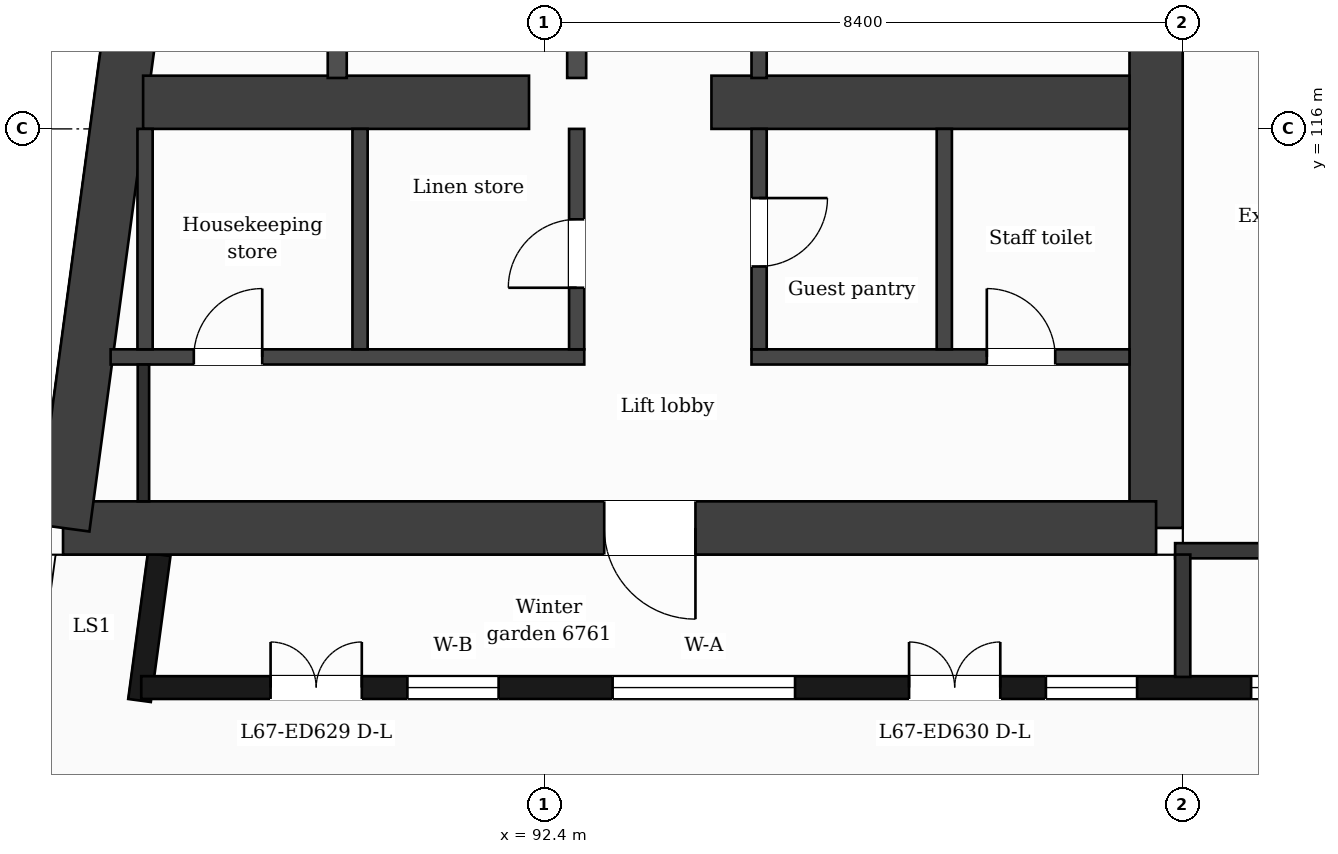
"""IFC4 building model, lengths in metres.
Left out: names, types, materials, properties, quantities, classifications, styles, units other than length and angle.
Written with IfcOpenShell. Run it as: python <this file> out.ifc"""

import sys

from ifc_helpers import new_model, si_unit, direction, frame, frame_2d, origin, place, context, subcontext, project, spatial, rectangle, extrude, element, fill, save


model = new_model("IFC4")
c1 = context("Model", 3, precision=1e-05, world=origin(), true_north=direction((0.0, 1.0)))
c2 = subcontext(c1, "Body", "Model", "MODEL_VIEW")
j1 = project(units=[si_unit("LENGTHUNIT", "METRE"), si_unit("PLANEANGLEUNIT", "RADIAN")], contexts=[c1])
p1 = place(None, origin())
s1 = spatial("IfcSite", under=j1, at=p1, CompositionType="ELEMENT")
p2 = place(p1, origin())
s2 = spatial("IfcBuilding", under=s1, at=p2, CompositionType="ELEMENT")
p3 = place(p2, frame((0.0, 0.0, 277.5)))
s3 = spatial("IfcBuildingStorey", under=s2, at=p3, CompositionType="ELEMENT", Elevation=277.5)
p4 = place(p3, frame((100.45, 132.05, 0.0), z_axis=(0.0, 0.0, 1.0), x_axis=(0.0, -1.0, 0.0)))
e1 = element("IfcWall", 1, at=p4, inside=s3, PredefinedType="SHEAR", context=c2, shape_type="SweptSolid", body=[
    extrude(rectangle(XDim=21.3, YDim=0.7, at=frame_2d((10.65, 0.0))), origin(), (0.0, 0.0, 1.0), 3.7),
])
p5 = place(p4, frame((7.9, 0.0, 0.0)))
e2 = element("IfcOpeningElement", 2, at=p5, cuts=e1, PredefinedType="OPENING", context=c2, shape_type="SweptSolid", body=[
    extrude(rectangle(XDim=1.4, YDim=2.1, at=frame_2d((0.7, 1.05))), frame((0.0, 0.36, 0.0), z_axis=(0.0, -1.0, 0.0), x_axis=(1.0, 0.0, 0.0)), (0.0, 0.0, 1.0), 0.72),
])
p6 = place(p3, frame((100.45, 110.75, 0.0), z_axis=(0.0, 0.0, 1.0), x_axis=(-1.0, 0.0, 0.0)))
e3 = element("IfcWall", 3, at=p6, inside=s3, PredefinedType="SHEAR", context=c2, shape_type="SweptSolid", body=[
    extrude(rectangle(XDim=14.38, YDim=0.7, at=frame_2d((7.19, 0.0))), origin(), (0.0, 0.0, 1.0), 3.7),
])
p7 = place(p6, frame((6.06, 0.0, 0.0)))
e4 = element("IfcOpeningElement", 4, at=p7, cuts=e3, PredefinedType="OPENING", context=c2, shape_type="SweptSolid", body=[
    extrude(rectangle(XDim=1.2, YDim=2.1, at=frame_2d((0.6, 1.05))), frame((0.0, 0.36, 0.0), z_axis=(0.0, -1.0, 0.0), x_axis=(1.0, 0.0, 0.0)), (0.0, 0.0, 1.0), 0.72),
])
p8 = place(p3, frame((86.07, 110.75, 0.0), z_axis=(0.0, 0.0, 1.0), x_axis=(0.133406218907, 0.991061441464, 0.0)))
e5 = element("IfcWall", 5, at=p8, inside=s3, PredefinedType="SHEAR", context=c2, shape_type="SweptSolid", body=[
    extrude(rectangle(XDim=21.492, YDim=0.7, at=frame_2d((10.746, 0.0))), origin(), (0.0, 0.0, 1.0), 3.7),
])
p9 = place(p3, frame((87.123, 116.35, 0.0), z_axis=(0.0, 0.0, 1.0), x_axis=(1.0, 0.0, 0.0)))
e6 = element("IfcWall", 6, at=p9, inside=s3, PredefinedType="SHEAR", context=c2, shape_type="SweptSolid", body=[
    extrude(rectangle(XDim=5.077, YDim=0.7, at=frame_2d((2.539, 0.0))), origin(), (0.0, 0.0, 1.0), 3.7),
])
p10 = place(p3, frame((94.6, 116.35, 0.0), z_axis=(0.0, 0.0, 1.0), x_axis=(1.0, 0.0, 0.0)))
e7 = element("IfcWall", 7, at=p10, inside=s3, PredefinedType="SHEAR", context=c2, shape_type="SweptSolid", body=[
    extrude(rectangle(XDim=5.5, YDim=0.7, at=frame_2d((2.75, 0.0))), origin(), (0.0, 0.0, 1.0), 3.7),
])
p11 = place(p3, frame((87.334, 110.4, 0.0), z_axis=(0.0, 0.0, 1.0), x_axis=(-0.13345962011, -0.991054251694, 0.0)))
e8 = element("IfcWall", 8, at=p11, inside=s3, PredefinedType="SOLIDWALL", context=c2, shape_type="SweptSolid", body=[
    extrude(rectangle(XDim=1.937, YDim=0.3, at=frame_2d((0.969, 0.0))), origin(), (0.0, 0.0, 1.0), 3.38),
])
p12 = place(p3, frame((87.099, 108.65, 0.0), z_axis=(0.0, 0.0, 1.0), x_axis=(1.0, 0.0, 0.0)))
e9 = element("IfcWall", 9, at=p12, inside=s3, PredefinedType="SOLIDWALL", context=c2, shape_type="SweptSolid", body=[
    extrude(rectangle(XDim=52.774, YDim=0.3, at=frame_2d((26.387, 0.0))), origin(), (0.0, 0.0, 1.0), 3.38),
])
p13 = place(p12, frame((1.701, 0.0, 0.0)))
e10 = element("IfcOpeningElement", 10, at=p13, cuts=e9, PredefinedType="OPENING", context=c2, shape_type="SweptSolid", body=[
    extrude(rectangle(XDim=1.2, YDim=2.4, at=frame_2d((0.6, 1.2))), frame((0.0, 0.16, 0.0), z_axis=(0.0, -1.0, 0.0), x_axis=(1.0, 0.0, 0.0)), (0.0, 0.0, 1.0), 0.32),
])
p14 = place(p12, frame((3.501, 0.0, 0.9)))
e11 = element("IfcOpeningElement", 11, at=p14, cuts=e9, PredefinedType="OPENING", context=c2, shape_type="SweptSolid", body=[
    extrude(rectangle(XDim=1.2, YDim=2.1, at=frame_2d((0.6, 1.05))), frame((0.0, 0.16, 0.0), z_axis=(0.0, -1.0, 0.0), x_axis=(1.0, 0.0, 0.0)), (0.0, 0.0, 1.0), 0.32),
])
p15 = place(p12, frame((6.201, 0.0, 0.9)))
e12 = element("IfcOpeningElement", 12, at=p15, cuts=e9, PredefinedType="OPENING", context=c2, shape_type="SweptSolid", body=[
    extrude(rectangle(XDim=2.4, YDim=2.1, at=frame_2d((1.2, 1.05))), frame((0.0, 0.16, 0.0), z_axis=(0.0, -1.0, 0.0), x_axis=(1.0, 0.0, 0.0)), (0.0, 0.0, 1.0), 0.32),
])
p16 = place(p12, frame((10.102, 0.0, 0.0)))
e13 = element("IfcOpeningElement", 13, at=p16, cuts=e9, PredefinedType="OPENING", context=c2, shape_type="SweptSolid", body=[
    extrude(rectangle(XDim=1.2, YDim=2.4, at=frame_2d((0.6, 1.2))), frame((0.0, 0.16, 0.0), z_axis=(0.0, -1.0, 0.0), x_axis=(1.0, 0.0, 0.0)), (0.0, 0.0, 1.0), 0.32),
])
p17 = place(p12, frame((11.901, 0.0, 0.9)))
e14 = element("IfcOpeningElement", 14, at=p17, cuts=e9, PredefinedType="OPENING", context=c2, shape_type="SweptSolid", body=[
    extrude(rectangle(XDim=1.2, YDim=2.1, at=frame_2d((0.6, 1.05))), frame((0.0, 0.16, 0.0), z_axis=(0.0, -1.0, 0.0), x_axis=(1.0, 0.0, 0.0)), (0.0, 0.0, 1.0), 0.32),
])
p18 = place(p12, frame((14.602, 0.0, 0.9)))
e15 = element("IfcOpeningElement", 15, at=p18, cuts=e9, PredefinedType="OPENING", context=c2, shape_type="SweptSolid", body=[
    extrude(rectangle(XDim=2.4, YDim=2.1, at=frame_2d((1.2, 1.05))), frame((0.0, 0.16, 0.0), z_axis=(0.0, -1.0, 0.0), x_axis=(1.0, 0.0, 0.0)), (0.0, 0.0, 1.0), 0.32),
])
p19 = place(p12, frame((18.802, 0.0, 0.9)))
e16 = element("IfcOpeningElement", 16, at=p19, cuts=e9, PredefinedType="OPENING", context=c2, shape_type="SweptSolid", body=[
    extrude(rectangle(XDim=2.4, YDim=2.1, at=frame_2d((1.2, 1.05))), frame((0.0, 0.16, 0.0), z_axis=(0.0, -1.0, 0.0), x_axis=(1.0, 0.0, 0.0)), (0.0, 0.0, 1.0), 0.32),
])
p20 = place(p12, frame((23.602, 0.0, 0.9)))
e17 = element("IfcOpeningElement", 17, at=p20, cuts=e9, PredefinedType="OPENING", context=c2, shape_type="SweptSolid", body=[
    extrude(rectangle(XDim=1.2, YDim=2.1, at=frame_2d((0.6, 1.05))), frame((0.0, 0.16, 0.0), z_axis=(0.0, -1.0, 0.0), x_axis=(1.0, 0.0, 0.0)), (0.0, 0.0, 1.0), 0.32),
])
p21 = place(p12, frame((27.802, 0.0, 0.9)))
e18 = element("IfcOpeningElement", 18, at=p21, cuts=e9, PredefinedType="OPENING", context=c2, shape_type="SweptSolid", body=[
    extrude(rectangle(XDim=1.2, YDim=2.1, at=frame_2d((0.6, 1.05))), frame((0.0, 0.16, 0.0), z_axis=(0.0, -1.0, 0.0), x_axis=(1.0, 0.0, 0.0)), (0.0, 0.0, 1.0), 0.32),
])
p22 = place(p12, frame((31.401, 0.0, 0.9)))
e19 = element("IfcOpeningElement", 19, at=p22, cuts=e9, PredefinedType="OPENING", context=c2, shape_type="SweptSolid", body=[
    extrude(rectangle(XDim=2.4, YDim=2.1, at=frame_2d((1.2, 1.05))), frame((0.0, 0.16, 0.0), z_axis=(0.0, -1.0, 0.0), x_axis=(1.0, 0.0, 0.0)), (0.0, 0.0, 1.0), 0.32),
])
p23 = place(p12, frame((35.602, 0.0, 0.9)))
e20 = element("IfcOpeningElement", 20, at=p23, cuts=e9, PredefinedType="OPENING", context=c2, shape_type="SweptSolid", body=[
    extrude(rectangle(XDim=2.4, YDim=2.1, at=frame_2d((1.2, 1.05))), frame((0.0, 0.16, 0.0), z_axis=(0.0, -1.0, 0.0), x_axis=(1.0, 0.0, 0.0)), (0.0, 0.0, 1.0), 0.32),
])
p24 = place(p12, frame((39.802, 0.0, 0.9)))
e21 = element("IfcOpeningElement", 21, at=p24, cuts=e9, PredefinedType="OPENING", context=c2, shape_type="SweptSolid", body=[
    extrude(rectangle(XDim=2.4, YDim=2.1, at=frame_2d((1.2, 1.05))), frame((0.0, 0.16, 0.0), z_axis=(0.0, -1.0, 0.0), x_axis=(1.0, 0.0, 0.0)), (0.0, 0.0, 1.0), 0.32),
])
p25 = place(p12, frame((44.001, 0.0, 0.9)))
e22 = element("IfcOpeningElement", 22, at=p25, cuts=e9, PredefinedType="OPENING", context=c2, shape_type="SweptSolid", body=[
    extrude(rectangle(XDim=2.4, YDim=2.1, at=frame_2d((1.2, 1.05))), frame((0.0, 0.16, 0.0), z_axis=(0.0, -1.0, 0.0), x_axis=(1.0, 0.0, 0.0)), (0.0, 0.0, 1.0), 0.32),
])
p26 = place(p12, frame((48.201, 0.0, 0.9)))
e23 = element("IfcOpeningElement", 23, at=p26, cuts=e9, PredefinedType="OPENING", context=c2, shape_type="SweptSolid", body=[
    extrude(rectangle(XDim=2.4, YDim=2.1, at=frame_2d((1.2, 1.05))), frame((0.0, 0.16, 0.0), z_axis=(0.0, -1.0, 0.0), x_axis=(1.0, 0.0, 0.0)), (0.0, 0.0, 1.0), 0.32),
])
p27 = place(p3, frame((100.7, 110.45, 0.0), z_axis=(0.0, 0.0, 1.0), x_axis=(1.0, 0.0, 0.0)))
e24 = element("IfcWall", 24, at=p27, inside=s3, PredefinedType="PARTITIONING", context=c2, shape_type="SweptSolid", body=[
    extrude(rectangle(XDim=25.4, YDim=0.2, at=frame_2d((12.7, 0.0))), origin(), (0.0, 0.0, 1.0), 3.38),
])
p28 = place(p3, frame((86.696, 113.0, 0.0), z_axis=(0.0, 0.0, 1.0), x_axis=(1.0, 0.0, 0.0)))
e25 = element("IfcWall", 25, at=p28, inside=s3, PredefinedType="PARTITIONING", context=c2, shape_type="SweptSolid", body=[
    extrude(rectangle(XDim=6.231, YDim=0.2, at=frame_2d((3.116, 0.0))), origin(), (0.0, 0.0, 1.0), 3.38),
])
p29 = place(p28, frame((1.094, 0.0, 0.0)))
e26 = element("IfcOpeningElement", 26, at=p29, cuts=e25, PredefinedType="OPENING", context=c2, shape_type="SweptSolid", body=[
    extrude(rectangle(XDim=0.9, YDim=2.1, at=frame_2d((0.45, 1.05))), frame((0.0, 0.11, 0.0), z_axis=(0.0, -1.0, 0.0), x_axis=(1.0, 0.0, 0.0)), (0.0, 0.0, 1.0), 0.22),
])
p30 = place(p3, frame((95.127, 113.0, 0.0), z_axis=(0.0, 0.0, 1.0), x_axis=(1.0, 0.0, 0.0)))
e27 = element("IfcWall", 27, at=p30, inside=s3, PredefinedType="PARTITIONING", context=c2, shape_type="SweptSolid", body=[
    extrude(rectangle(XDim=4.973, YDim=0.2, at=frame_2d((2.487, 0.0))), origin(), (0.0, 0.0, 1.0), 3.38),
])
p31 = place(p30, frame((3.096, 0.0, 0.0)))
e28 = element("IfcOpeningElement", 28, at=p31, cuts=e27, PredefinedType="OPENING", context=c2, shape_type="SweptSolid", body=[
    extrude(rectangle(XDim=0.9, YDim=2.1, at=frame_2d((0.45, 1.05))), frame((0.0, 0.11, 0.0), z_axis=(0.0, -1.0, 0.0), x_axis=(1.0, 0.0, 0.0)), (0.0, 0.0, 1.0), 0.22),
])
p32 = place(p3, frame((87.148, 113.1, 0.0), z_axis=(0.0, 0.0, 1.0), x_axis=(0.0, 1.0, 0.0)))
e29 = element("IfcWall", 29, at=p32, inside=s3, PredefinedType="PARTITIONING", context=c2, shape_type="SweptSolid", body=[
    extrude(rectangle(XDim=2.9, YDim=0.2, at=frame_2d((1.45, 0.0))), origin(), (0.0, 0.0, 1.0), 3.38),
])
p33 = place(p3, frame((87.127, 111.1, 0.0), z_axis=(0.0, 0.0, 1.0), x_axis=(0.0, 1.0, 0.0)))
e30 = element("IfcWall", 30, at=p33, inside=s3, PredefinedType="PARTITIONING", context=c2, shape_type="SweptSolid", body=[
    extrude(rectangle(XDim=1.8, YDim=0.15, at=frame_2d((0.9, 0.0))), origin(), (0.0, 0.0, 1.0), 3.38),
])
p34 = place(p3, frame((89.677, 116.67, 0.0), z_axis=(0.0, 0.0, 1.0), x_axis=(0.0, 1.0, 0.0)))
e31 = element("IfcWall", 31, at=p34, inside=s3, PredefinedType="PARTITIONING", context=c2, shape_type="SweptSolid", body=[
    extrude(rectangle(XDim=7.155, YDim=0.25, at=frame_2d((3.578, 0.0))), origin(), (0.0, 0.0, 1.0), 3.38),
])
p35 = place(p3, frame((89.977, 113.1, 0.0), z_axis=(0.0, 0.0, 1.0), x_axis=(0.0, 1.0, 0.0)))
e32 = element("IfcWall", 32, at=p35, inside=s3, PredefinedType="PARTITIONING", context=c2, shape_type="SweptSolid", body=[
    extrude(rectangle(XDim=2.9, YDim=0.2, at=frame_2d((1.45, 0.0))), origin(), (0.0, 0.0, 1.0), 3.38),
])
p36 = place(p3, frame((92.827, 113.1, 0.0), z_axis=(0.0, 0.0, 1.0), x_axis=(0.0, 1.0, 0.0)))
e33 = element("IfcWall", 33, at=p36, inside=s3, PredefinedType="PARTITIONING", context=c2, shape_type="SweptSolid", body=[
    extrude(rectangle(XDim=2.9, YDim=0.2, at=frame_2d((1.45, 0.0))), origin(), (0.0, 0.0, 1.0), 3.38),
])
p37 = place(p36, frame((0.81, 0.0, 0.0)))
e34 = element("IfcOpeningElement", 34, at=p37, cuts=e33, PredefinedType="OPENING", context=c2, shape_type="SweptSolid", body=[
    extrude(rectangle(XDim=0.9, YDim=2.1, at=frame_2d((0.45, 1.05))), frame((0.0, 0.11, 0.0), z_axis=(0.0, -1.0, 0.0), x_axis=(1.0, 0.0, 0.0)), (0.0, 0.0, 1.0), 0.22),
])
p38 = place(p3, frame((92.827, 116.67, 0.0), z_axis=(0.0, 0.0, 1.0), x_axis=(0.0, 1.0, 0.0)))
e35 = element("IfcWall", 35, at=p38, inside=s3, PredefinedType="PARTITIONING", context=c2, shape_type="SweptSolid", body=[
    extrude(rectangle(XDim=7.155, YDim=0.25, at=frame_2d((3.578, 0.0))), origin(), (0.0, 0.0, 1.0), 3.38),
])
p39 = place(p38, frame((5.855, 0.0, 0.0)))
e36 = element("IfcOpeningElement", 36, at=p39, cuts=e35, PredefinedType="OPENING", context=c2, shape_type="SweptSolid", body=[
    extrude(rectangle(XDim=0.95, YDim=2.1, at=frame_2d((0.475, 1.05))), frame((0.0, 0.135, 0.0), z_axis=(0.0, -1.0, 0.0), x_axis=(1.0, 0.0, 0.0)), (0.0, 0.0, 1.0), 0.27),
])
p40 = place(p3, frame((95.227, 113.1, 0.0), z_axis=(0.0, 0.0, 1.0), x_axis=(0.0, 1.0, 0.0)))
e37 = element("IfcWall", 37, at=p40, inside=s3, PredefinedType="PARTITIONING", context=c2, shape_type="SweptSolid", body=[
    extrude(rectangle(XDim=2.9, YDim=0.2, at=frame_2d((1.45, 0.0))), origin(), (0.0, 0.0, 1.0), 3.38),
])
p41 = place(p40, frame((1.09, 0.0, 0.0)))
e38 = element("IfcOpeningElement", 38, at=p41, cuts=e37, PredefinedType="OPENING", context=c2, shape_type="SweptSolid", body=[
    extrude(rectangle(XDim=0.9, YDim=2.1, at=frame_2d((0.45, 1.05))), frame((0.0, 0.11, 0.0), z_axis=(0.0, -1.0, 0.0), x_axis=(1.0, 0.0, 0.0)), (0.0, 0.0, 1.0), 0.22),
])
p42 = place(p3, frame((95.227, 116.67, 0.0), z_axis=(0.0, 0.0, 1.0), x_axis=(0.0, 1.0, 0.0)))
e39 = element("IfcWall", 39, at=p42, inside=s3, PredefinedType="PARTITIONING", context=c2, shape_type="SweptSolid", body=[
    extrude(rectangle(XDim=5.33, YDim=0.2, at=frame_2d((2.665, 0.0))), origin(), (0.0, 0.0, 1.0), 3.38),
])
p43 = place(p42, frame((0.88, 0.0, 0.0)))
e40 = element("IfcOpeningElement", 40, at=p43, cuts=e39, PredefinedType="OPENING", context=c2, shape_type="SweptSolid", body=[
    extrude(rectangle(XDim=0.9, YDim=2.1, at=frame_2d((0.45, 1.05))), frame((0.0, 0.11, 0.0), z_axis=(0.0, -1.0, 0.0), x_axis=(1.0, 0.0, 0.0)), (0.0, 0.0, 1.0), 0.22),
])
p44 = place(p3, frame((97.664, 113.1, 0.0), z_axis=(0.0, 0.0, 1.0), x_axis=(0.0, 1.0, 0.0)))
e41 = element("IfcWall", 41, at=p44, inside=s3, PredefinedType="PARTITIONING", context=c2, shape_type="SweptSolid", body=[
    extrude(rectangle(XDim=2.9, YDim=0.2, at=frame_2d((1.45, 0.0))), origin(), (0.0, 0.0, 1.0), 3.38),
])
p45 = place(p3, frame((100.8, 108.79, 0.0), z_axis=(0.0, 0.0, 1.0), x_axis=(0.0, 1.0, 0.0)))
e42 = element("IfcWall", 42, at=p45, inside=s3, PredefinedType="PARTITIONING", context=c2, shape_type="SweptSolid", body=[
    extrude(rectangle(XDim=1.61, YDim=0.2, at=frame_2d((0.805, 0.0))), origin(), (0.0, 0.0, 1.0), 3.38),
])
p46 = place(p13, origin())
e43 = element("IfcDoor", 43, at=p46, inside=s3, OperationType="DOUBLE_DOOR_SINGLE_SWING", PredefinedType="DOOR", context=c2, shape_type="SweptSolid", body=[
    extrude(rectangle(XDim=1.2, YDim=2.4, at=frame_2d((0.6, 1.2))), frame((0.0, 0.025, 0.0), z_axis=(0.0, -1.0, 0.0), x_axis=(1.0, 0.0, 0.0)), (0.0, 0.0, 1.0), 0.05),
])
fill(e10, e43)
p47 = place(p14, origin())
e44 = element("IfcWindow", 44, at=p47, inside=s3, PartitioningType="SINGLE_PANEL", PredefinedType="WINDOW", context=c2, shape_type="SweptSolid", body=[
    extrude(rectangle(XDim=1.2, YDim=2.1, at=frame_2d((0.6, 1.05))), frame((0.0, 0.03, 0.0), z_axis=(0.0, -1.0, 0.0), x_axis=(1.0, 0.0, 0.0)), (0.0, 0.0, 1.0), 0.06),
])
fill(e11, e44)
p48 = place(p15, origin())
e45 = element("IfcWindow", 45, at=p48, inside=s3, PartitioningType="SINGLE_PANEL", PredefinedType="WINDOW", context=c2, shape_type="SweptSolid", body=[
    extrude(rectangle(XDim=2.4, YDim=2.1, at=frame_2d((1.2, 1.05))), frame((0.0, 0.03, 0.0), z_axis=(0.0, -1.0, 0.0), x_axis=(1.0, 0.0, 0.0)), (0.0, 0.0, 1.0), 0.06),
])
fill(e12, e45)
p49 = place(p16, origin())
e46 = element("IfcDoor", 46, at=p49, inside=s3, OperationType="DOUBLE_DOOR_SINGLE_SWING", PredefinedType="DOOR", context=c2, shape_type="SweptSolid", body=[
    extrude(rectangle(XDim=1.2, YDim=2.4, at=frame_2d((0.6, 1.2))), frame((0.0, 0.025, 0.0), z_axis=(0.0, -1.0, 0.0), x_axis=(1.0, 0.0, 0.0)), (0.0, 0.0, 1.0), 0.05),
])
fill(e13, e46)
p50 = place(p17, origin())
e47 = element("IfcWindow", 47, at=p50, inside=s3, PartitioningType="SINGLE_PANEL", PredefinedType="WINDOW", context=c2, shape_type="SweptSolid", body=[
    extrude(rectangle(XDim=1.2, YDim=2.1, at=frame_2d((0.6, 1.05))), frame((0.0, 0.03, 0.0), z_axis=(0.0, -1.0, 0.0), x_axis=(1.0, 0.0, 0.0)), (0.0, 0.0, 1.0), 0.06),
])
fill(e14, e47)
p51 = place(p18, origin())
e48 = element("IfcWindow", 48, at=p51, inside=s3, PartitioningType="SINGLE_PANEL", PredefinedType="WINDOW", context=c2, shape_type="SweptSolid", body=[
    extrude(rectangle(XDim=2.4, YDim=2.1, at=frame_2d((1.2, 1.05))), frame((0.0, 0.03, 0.0), z_axis=(0.0, -1.0, 0.0), x_axis=(1.0, 0.0, 0.0)), (0.0, 0.0, 1.0), 0.06),
])
fill(e15, e48)
p52 = place(p29, origin())
e49 = element("IfcDoor", 49, at=p52, inside=s3, OperationType="SINGLE_SWING_RIGHT", PredefinedType="DOOR", context=c2, shape_type="SweptSolid", body=[
    extrude(rectangle(XDim=0.9, YDim=2.1, at=frame_2d((0.45, 1.05))), frame((0.0, 0.025, 0.0), z_axis=(0.0, -1.0, 0.0), x_axis=(1.0, 0.0, 0.0)), (0.0, 0.0, 1.0), 0.05),
])
fill(e26, e49)
p53 = place(p37, origin())
e50 = element("IfcDoor", 50, at=p53, inside=s3, OperationType="SINGLE_SWING_LEFT", PredefinedType="DOOR", context=c2, shape_type="SweptSolid", body=[
    extrude(rectangle(XDim=0.9, YDim=2.1, at=frame_2d((0.45, 1.05))), frame((0.0, 0.025, 0.0), z_axis=(0.0, -1.0, 0.0), x_axis=(1.0, 0.0, 0.0)), (0.0, 0.0, 1.0), 0.05),
])
fill(e34, e50)
p54 = place(p41, origin())
e51 = element("IfcDoor", 51, at=p54, inside=s3, OperationType="SINGLE_SWING_RIGHT", PredefinedType="DOOR", context=c2, shape_type="SweptSolid", body=[
    extrude(rectangle(XDim=0.9, YDim=2.1, at=frame_2d((0.45, 1.05))), frame((0.0, 0.025, 0.0), z_axis=(0.0, -1.0, 0.0), x_axis=(1.0, 0.0, 0.0)), (0.0, 0.0, 1.0), 0.05),
])
fill(e38, e51)
p55 = place(p31, origin())
e52 = element("IfcDoor", 52, at=p55, inside=s3, OperationType="SINGLE_SWING_LEFT", PredefinedType="DOOR", context=c2, shape_type="SweptSolid", body=[
    extrude(rectangle(XDim=0.9, YDim=2.1, at=frame_2d((0.45, 1.05))), frame((0.0, 0.025, 0.0), z_axis=(0.0, -1.0, 0.0), x_axis=(1.0, 0.0, 0.0)), (0.0, 0.0, 1.0), 0.05),
])
fill(e28, e52)
p56 = place(p7, origin())
e53 = element("IfcDoor", 53, at=p56, inside=s3, OperationType="SINGLE_SWING_LEFT", PredefinedType="DOOR", context=c2, shape_type="SweptSolid", body=[
    extrude(rectangle(XDim=1.2, YDim=2.1, at=frame_2d((0.6, 1.05))), frame((0.0, 0.025, 0.0), z_axis=(0.0, -1.0, 0.0), x_axis=(1.0, 0.0, 0.0)), (0.0, 0.0, 1.0), 0.05),
])
fill(e4, e53)
save(model, sys.argv[1])
